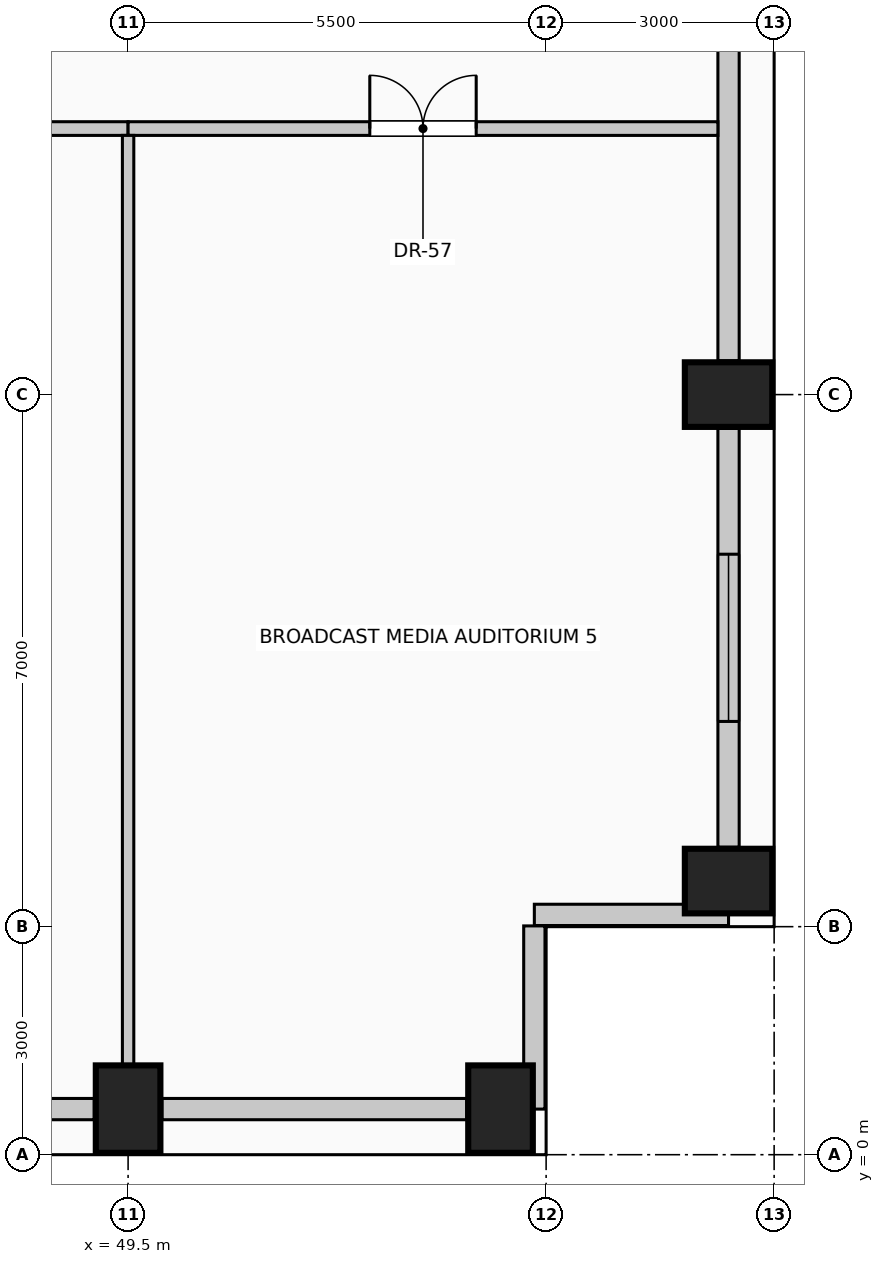
"""IFC4 building model, lengths in metres.
Left out: names, types, materials, properties, quantities, classifications, styles, units other than length and angle.
Written with IfcOpenShell. Run it as: python <this file> out.ifc"""

import sys

from ifc_helpers import new_model, si_unit, direction, frame, frame_2d, origin, origin_2d, place, context, subcontext, project, spatial, rectangle, extrude, element, fill, save


model = new_model("IFC4")
c1 = context("Model", 3, precision=1e-05, world=origin(), true_north=direction((0.0, 1.0)))
c2 = subcontext(c1, "Body", "Model", "MODEL_VIEW")
j1 = project(units=[si_unit("LENGTHUNIT", "METRE"), si_unit("PLANEANGLEUNIT", "RADIAN")], contexts=[c1])
p1 = place(None, origin())
s1 = spatial("IfcSite", under=j1, at=p1, CompositionType="ELEMENT")
p2 = place(p1, origin())
s2 = spatial("IfcBuilding", under=s1, at=p2, CompositionType="ELEMENT")
p3 = place(p2, frame((0.0, 0.0, 92.6)))
s3 = spatial("IfcBuildingStorey", under=s2, at=p3, CompositionType="ELEMENT", Elevation=92.6)
for number, where, z_axis, x_axis in (
    (1, (49.5, 0.6, 0.0), (0.0, 0.0, 1.0), (1.0, 0.0, 0.0)),
    (2, (54.4, 0.6, 0.0), (0.0, 0.0, 1.0), (1.0, 0.0, 0.0)),
    (3, (57.4, 3.6, 0.0), (0.0, 0.0, 1.0), (0.0, 1.0, 0.0)),
    (4, (57.4, 10.0, 0.0), (0.0, 0.0, 1.0), (0.0, 1.0, 0.0)),
):
    element("IfcColumn", number, at=place(p3, frame(where, z_axis=z_axis, x_axis=x_axis)), inside=s3, PredefinedType="COLUMN", context=c2, shape_type="SweptSolid", body=[
        extrude(rectangle(XDim=0.85, YDim=1.15, at=origin_2d()), origin(), (0.0, 0.0, 1.0), 4.0),
    ])
p4 = place(p3, frame((49.055, 0.6, 0.0), z_axis=(0.0, 0.0, 1.0), x_axis=(-1.0, 0.0, 0.0)))
e5 = element("IfcWall", 5, at=p4, inside=s3, PredefinedType="SOLIDWALL", context=c2, shape_type="SweptSolid", body=[
    extrude(rectangle(XDim=4.61, YDim=0.28, at=frame_2d((2.305, 0.0))), origin(), (0.0, 0.0, 1.0), 2.875),
])
p5 = place(p3, frame((53.955, 0.6, 0.0), z_axis=(0.0, 0.0, 1.0), x_axis=(-1.0, 0.0, 0.0)))
e6 = element("IfcWall", 6, at=p5, inside=s3, PredefinedType="SOLIDWALL", context=c2, shape_type="SweptSolid", body=[
    extrude(rectangle(XDim=4.01, YDim=0.28, at=frame_2d((2.005, 0.0))), origin(), (0.0, 0.0, 1.0), 2.875),
])
p6 = place(p3, frame((57.4, 9.555, 0.0), z_axis=(0.0, 0.0, 1.0), x_axis=(0.0, -1.0, 0.0)))
e7 = element("IfcWall", 7, at=p6, inside=s3, PredefinedType="SOLIDWALL", context=c2, shape_type="SweptSolid", body=[
    extrude(rectangle(XDim=5.51, YDim=0.28, at=frame_2d((2.755, 0.0))), origin(), (0.0, 0.0, 1.0), 2.875),
])
p7 = place(p6, frame((1.655, 0.0, 0.5)))
e8 = element("IfcOpeningElement", 8, at=p7, cuts=e7, PredefinedType="OPENING", context=c2, shape_type="SweptSolid", body=[
    extrude(rectangle(XDim=2.2, YDim=1.95, at=frame_2d((1.1, 0.975))), frame((0.0, 0.15, 0.0), z_axis=(0.0, -1.0, 0.0), x_axis=(1.0, 0.0, 0.0)), (0.0, 0.0, 1.0), 0.3),
])
p8 = place(p3, frame((57.4, 17.555, 0.0), z_axis=(0.0, 0.0, 1.0), x_axis=(0.0, -1.0, 0.0)))
e9 = element("IfcWall", 9, at=p8, inside=s3, PredefinedType="SOLIDWALL", context=c2, shape_type="SweptSolid", body=[
    extrude(rectangle(XDim=7.11, YDim=0.28, at=frame_2d((3.555, 0.0))), origin(), (0.0, 0.0, 1.0), 2.875),
])
p9 = place(p3, frame((57.4, 3.155, 0.0), z_axis=(0.0, 0.0, 1.0), x_axis=(-1.0, 0.0, 0.0)))
e10 = element("IfcWall", 10, at=p9, inside=s3, PredefinedType="SOLIDWALL", context=c2, shape_type="SweptSolid", body=[
    extrude(rectangle(XDim=2.555, YDim=0.28, at=frame_2d((1.277, 0.0))), origin(), (0.0, 0.0, 1.0), 3.725),
])
p10 = place(p3, frame((54.845, 3.01, 0.0), z_axis=(0.0, 0.0, 1.0), x_axis=(0.0, -1.0, 0.0)))
e11 = element("IfcWall", 11, at=p10, inside=s3, PredefinedType="SOLIDWALL", context=c2, shape_type="SweptSolid", body=[
    extrude(rectangle(XDim=2.41, YDim=0.28, at=frame_2d((1.205, 0.0))), origin(), (0.0, 0.0, 1.0), 3.725),
])
p11 = place(p3, frame((38.32, 13.5, 0.0), z_axis=(0.0, 0.0, 1.0), x_axis=(1.0, 0.0, 0.0)))
e12 = element("IfcWall", 12, at=p11, inside=s3, PredefinedType="PARTITIONING", context=c2, shape_type="SweptSolid", body=[
    extrude(rectangle(XDim=11.18, YDim=0.18, at=frame_2d((5.59, 0.0))), origin(), (0.0, 0.0, 1.0), 3.725),
])
p12 = place(p11, frame((4.89, 0.0, 0.0)))
e13 = element("IfcOpeningElement", 13, at=p12, cuts=e12, PredefinedType="OPENING", context=c2, shape_type="SweptSolid", body=[
    extrude(rectangle(XDim=1.4, YDim=2.2, at=frame_2d((0.7, 1.1))), frame((0.0, 0.1, 0.0), z_axis=(0.0, -1.0, 0.0), x_axis=(1.0, 0.0, 0.0)), (0.0, 0.0, 1.0), 0.2),
])
p13 = place(p3, frame((49.5, 13.5, 0.0), z_axis=(0.0, 0.0, 1.0), x_axis=(1.0, 0.0, 0.0)))
e14 = element("IfcWall", 14, at=p13, inside=s3, PredefinedType="PARTITIONING", context=c2, shape_type="SweptSolid", body=[
    extrude(rectangle(XDim=7.76, YDim=0.18, at=frame_2d((3.88, 0.0))), origin(), (0.0, 0.0, 1.0), 3.725),
])
p14 = place(p13, frame((3.18, 0.0, 0.0)))
e15 = element("IfcOpeningElement", 15, at=p14, cuts=e14, PredefinedType="OPENING", context=c2, shape_type="SweptSolid", body=[
    extrude(rectangle(XDim=1.4, YDim=2.2, at=frame_2d((0.7, 1.1))), frame((0.0, 0.1, 0.0), z_axis=(0.0, -1.0, 0.0), x_axis=(1.0, 0.0, 0.0)), (0.0, 0.0, 1.0), 0.2),
])
p15 = place(p3, frame((49.5, 1.175, 0.0), z_axis=(0.0, 0.0, 1.0), x_axis=(0.0, 1.0, 0.0)))
e16 = element("IfcWall", 16, at=p15, inside=s3, PredefinedType="PARTITIONING", context=c2, shape_type="SweptSolid", body=[
    extrude(rectangle(XDim=12.235, YDim=0.15, at=frame_2d((6.117, 0.0))), origin(), (0.0, 0.0, 1.0), 3.725),
])
p16 = place(p7, origin())
e17 = element("IfcWindow", 17, at=p16, inside=s3, PartitioningType="SINGLE_PANEL", PredefinedType="WINDOW", context=c2, shape_type="SweptSolid", body=[
    extrude(rectangle(XDim=2.2, YDim=1.95, at=frame_2d((1.1, 0.975))), frame((0.0, 0.03, 0.0), z_axis=(0.0, -1.0, 0.0), x_axis=(1.0, 0.0, 0.0)), (0.0, 0.0, 1.0), 0.06),
])
fill(e8, e17)
p17 = place(p14, origin())
e18 = element("IfcDoor", 18, at=p17, inside=s3, OperationType="DOUBLE_DOOR_SINGLE_SWING", PredefinedType="DOOR", context=c2, shape_type="SweptSolid", body=[
    extrude(rectangle(XDim=1.4, YDim=2.2, at=frame_2d((0.7, 1.1))), frame((0.0, 0.025, 0.0), z_axis=(0.0, -1.0, 0.0), x_axis=(1.0, 0.0, 0.0)), (0.0, 0.0, 1.0), 0.05),
])
fill(e15, e18)
save(model, sys.argv[1])
